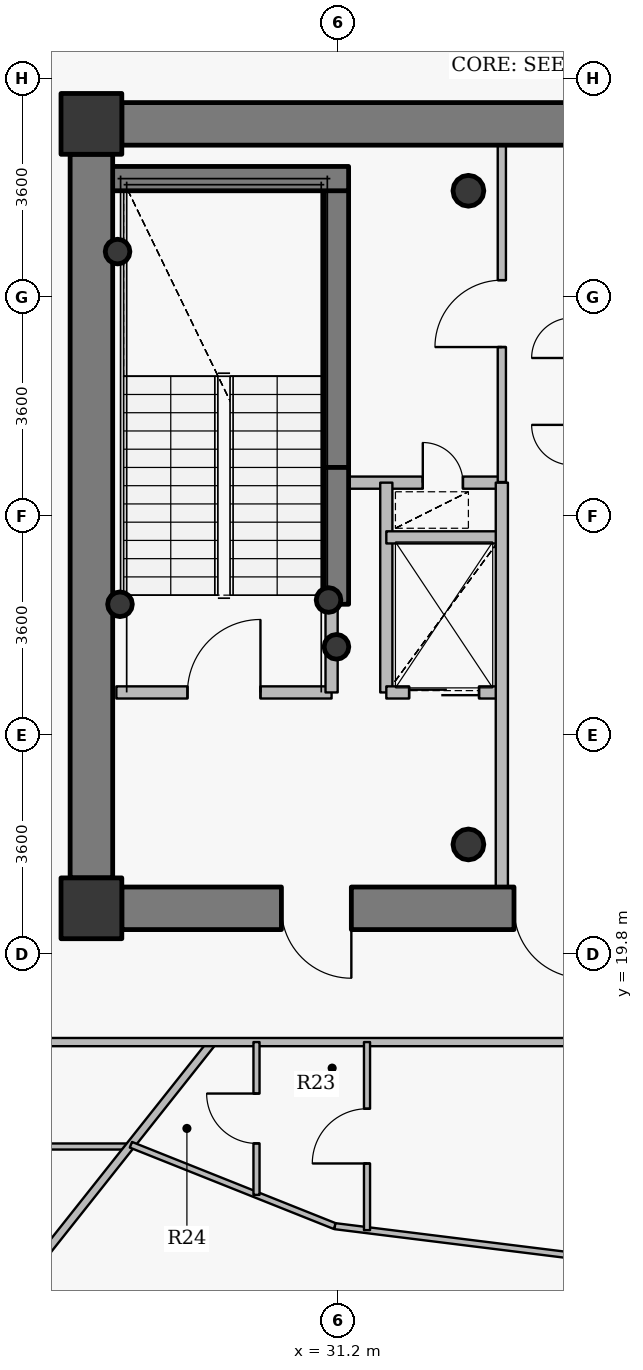
"""IFC4 building model, lengths in metres.
Left out: names, types, materials, properties, quantities, classifications, styles, units other than length and angle.
Written with IfcOpenShell. Run it as: python <this file> out.ifc"""

import sys

from ifc_helpers import new_model, si_unit, direction, frame, frame_2d, origin, origin_2d, place, context, subcontext, project, spatial, rectangle, hollow_circle, extrude, source, transform, mapped, element, fill, save


model = new_model("IFC4")
c1 = context("Model", 3, precision=1e-05, world=origin(), true_north=direction((0.0, 1.0)))
c2 = subcontext(c1, "Body", "Model", "MODEL_VIEW")
j1 = project(units=[si_unit("LENGTHUNIT", "METRE"), si_unit("PLANEANGLEUNIT", "RADIAN")], contexts=[c1])
p1 = place(None, origin())
s1 = spatial("IfcSite", under=j1, at=p1, CompositionType="ELEMENT")
p2 = place(p1, origin())
s2 = spatial("IfcBuilding", under=s1, at=p2, CompositionType="ELEMENT")
p3 = place(p2, frame((0.0, 0.0, 276.75)))
s3 = spatial("IfcBuildingStorey", under=s2, at=p3, CompositionType="ELEMENT", Elevation=276.75)
for number, where, z_axis, x_axis in (
    (1, (27.15, 20.55, 0.0), (0.0, 0.0, 1.0), (1.0, 0.0, 0.0)),
    (2, (27.15, 33.45, 0.0), (0.0, 0.0, 1.0), (1.0, 0.0, 0.0)),
):
    element("IfcColumn", number, at=place(p3, frame(where, z_axis=z_axis, x_axis=x_axis)), inside=s3, PredefinedType="COLUMN", context=c2, shape_type="SweptSolid", body=[
        extrude(rectangle(XDim=1.0, YDim=1.0, at=origin_2d()), origin(), (0.0, 0.0, 1.0), 3.75),
    ])
for number, where, z_axis, x_axis in (
    (3, (33.35, 21.6, 0.0), (0.0, 0.0, 1.0), (1.0, 0.0, 0.0)),
    (4, (33.35, 32.35, 0.0), (0.0, 0.0, 1.0), (1.0, 0.0, 0.0)),
):
    element("IfcColumn", number, at=place(p3, frame(where, z_axis=z_axis, x_axis=x_axis)), inside=s3, PredefinedType="COLUMN", context=c2, shape_type="SweptSolid", body=[
        extrude(hollow_circle(Radius=0.254, WallThickness=0.02, at=origin_2d()), origin(), (0.0, 0.0, 1.0), 3.75),
    ])
p4 = place(p3, frame((31.18, 27.8, 0.0), z_axis=(0.0, 0.0, 1.0), x_axis=(0.0, 1.0, 0.0)))
e5 = element("IfcWall", 5, at=p4, inside=s3, PredefinedType="SHEAR", context=c2, shape_type="SweptSolid", body=[
    extrude(rectangle(XDim=4.75, YDim=0.4, at=frame_2d((2.375, 0.0))), origin(), (0.0, 0.0, 1.0), 3.75),
])
p5 = place(p3, frame((27.25, 32.55, 0.0), z_axis=(0.0, 0.0, 1.0), x_axis=(1.0, 0.0, 0.0)))
e6 = element("IfcWall", 6, at=p5, inside=s3, PredefinedType="SHEAR", context=c2, shape_type="SweptSolid", body=[
    extrude(rectangle(XDim=4.13, YDim=0.4, at=frame_2d((2.065, 0.0))), origin(), (0.0, 0.0, 1.0), 3.75),
])
for number, where, z_axis, x_axis in (
    (7, (27.58, 31.35, 0.0), (0.0, 0.0, 1.0), (1.0, 0.0, 0.0)),
    (8, (31.05, 25.62, 0.0), (0.0, 0.0, 1.0), (1.0, 0.0, 0.0)),
    (9, (31.18, 24.85, 0.0), (0.0, 0.0, 1.0), (1.0, 0.0, 0.0)),
    (10, (27.62, 25.55, 0.0), (0.0, 0.0, 1.0), (1.0, 0.0, 0.0)),
):
    element("IfcColumn", number, at=place(p3, frame(where, z_axis=z_axis, x_axis=x_axis)), inside=s3, PredefinedType="COLUMN", context=c2, shape_type="SweptSolid", body=[
        extrude(hollow_circle(Radius=0.203, WallThickness=0.016, at=origin_2d()), origin(), (0.0, 0.0, 1.0), 3.75),
    ])
p6 = place(p3, frame((27.65, 33.45, 0.0), z_axis=(0.0, 0.0, 1.0), x_axis=(1.0, 0.0, 0.0)))
e11 = element("IfcWall", 11, at=p6, inside=s3, PredefinedType="SHEAR", context=c2, shape_type="SweptSolid", body=[
    extrude(rectangle(XDim=16.7, YDim=0.7, at=frame_2d((8.35, 0.0))), origin(), (0.0, 0.0, 1.0), 3.05),
])
p7 = place(p6, frame((12.775, 0.0, 0.0)))
e12 = element("IfcOpeningElement", 12, at=p7, cuts=e11, PredefinedType="OPENING", context=c2, shape_type="SweptSolid", body=[
    extrude(rectangle(XDim=1.15, YDim=2.15, at=origin_2d()), frame((0.575, 0.36, 1.075), z_axis=(0.0, -1.0, 0.0), x_axis=(1.0, 0.0, 0.0)), (0.0, 0.0, 1.0), 0.72),
])
p8 = place(p3, frame((44.35, 20.55, 0.0), z_axis=(0.0, 0.0, 1.0), x_axis=(-1.0, 0.0, 0.0)))
e13 = element("IfcWall", 13, at=p8, inside=s3, PredefinedType="SHEAR", context=c2, shape_type="SweptSolid", body=[
    extrude(rectangle(XDim=16.7, YDim=0.7, at=frame_2d((8.35, 0.0))), origin(), (0.0, 0.0, 1.0), 3.05),
])
p9 = place(p8, frame((12.925, 0.0, 0.0)))
e14 = element("IfcOpeningElement", 14, at=p9, cuts=e13, PredefinedType="OPENING", context=c2, shape_type="SweptSolid", body=[
    extrude(rectangle(XDim=1.15, YDim=2.15, at=origin_2d()), frame((0.575, 0.36, 1.075), z_axis=(0.0, -1.0, 0.0), x_axis=(1.0, 0.0, 0.0)), (0.0, 0.0, 1.0), 0.72),
])
p10 = place(p8, frame((9.1, 0.0, 0.0)))
e15 = element("IfcOpeningElement", 15, at=p10, cuts=e13, PredefinedType="OPENING", context=c2, shape_type="SweptSolid", body=[
    extrude(rectangle(XDim=1.15, YDim=2.15, at=origin_2d()), frame((0.575, 0.36, 1.075), z_axis=(0.0, -1.0, 0.0), x_axis=(1.0, 0.0, 0.0)), (0.0, 0.0, 1.0), 0.72),
])
p11 = place(p3, frame((27.15, 21.05, 0.0), z_axis=(0.0, 0.0, 1.0), x_axis=(0.0, 1.0, 0.0)))
e16 = element("IfcWall", 16, at=p11, inside=s3, PredefinedType="SHEAR", context=c2, shape_type="SweptSolid", body=[
    extrude(rectangle(XDim=11.9, YDim=0.7, at=frame_2d((5.95, 0.0))), origin(), (0.0, 0.0, 1.0), 3.05),
])
p12 = place(p3, frame((31.18, 25.55, 0.0), z_axis=(0.0, 0.0, 1.0), x_axis=(0.0, 1.0, 0.0)))
e17 = element("IfcWall", 17, at=p12, inside=s3, PredefinedType="SHEAR", context=c2, shape_type="SweptSolid", body=[
    extrude(rectangle(XDim=2.25, YDim=0.4, at=frame_2d((1.125, 0.0))), origin(), (0.0, 0.0, 1.0), 3.1),
])
p13 = place(p3, frame((18.118, 16.633, 0.0), z_axis=(0.0, 0.0, 1.0), x_axis=(1.0, 0.0, 0.0)))
e18 = element("IfcWall", 18, at=p13, inside=s3, PredefinedType="PARTITIONING", context=c2, shape_type="SweptSolid", body=[
    extrude(rectangle(XDim=9.659, YDim=0.1, at=frame_2d((4.83, 0.0))), origin(), (0.0, 0.0, 1.0), 2.985),
])
p14 = place(p13, frame((4.379, 0.0, 0.0)))
e19 = element("IfcOpeningElement", 19, at=p14, cuts=e18, PredefinedType="OPENING", context=c2, shape_type="SweptSolid", body=[
    extrude(rectangle(XDim=0.9, YDim=2.1, at=origin_2d()), frame((0.45, 0.06, 1.05), z_axis=(0.0, -1.0, 0.0), x_axis=(1.0, 0.0, 0.0)), (0.0, 0.0, 1.0), 0.12),
])
p15 = place(p3, frame((24.294, 12.242, 0.0), z_axis=(0.0, 0.0, 1.0), x_axis=(0.621439784824, 0.783461928774, 0.0)))
e20 = element("IfcWall", 20, at=p15, inside=s3, PredefinedType="PARTITIONING", context=c2, shape_type="SweptSolid", body=[
    extrude(rectangle(XDim=7.796, YDim=0.135, at=frame_2d((3.898, 0.0))), origin(), (0.0, 0.0, 1.0), 2.985),
])
p16 = place(p3, frame((24.95, 18.35, 0.0), z_axis=(0.0, 0.0, 1.0), x_axis=(1.0, 0.0, 0.0)))
e21 = element("IfcWall", 21, at=p16, inside=s3, PredefinedType="PARTITIONING", context=c2, shape_type="SweptSolid", body=[
    extrude(rectangle(XDim=10.1, YDim=0.135, at=frame_2d((5.05, 0.0))), origin(), (0.0, 0.0, 1.0), 3.035),
])
p17 = place(p3, frame((27.56, 24.1, 0.0), z_axis=(0.0, 0.0, 1.0), x_axis=(1.0, 0.0, 0.0)))
e22 = element("IfcWall", 22, at=p17, inside=s3, PredefinedType="PARTITIONING", context=c2, shape_type="SweptSolid", body=[
    extrude(rectangle(XDim=3.54, YDim=0.2, at=frame_2d((1.77, 0.0))), origin(), (0.0, 0.0, 1.0), 3.5),
])
p18 = place(p17, frame((1.17, 0.0, 0.0)))
e23 = element("IfcOpeningElement", 23, at=p18, cuts=e22, PredefinedType="OPENING", context=c2, shape_type="SweptSolid", body=[
    extrude(rectangle(XDim=1.2, YDim=2.15, at=origin_2d()), frame((0.6, 0.11, 1.075), z_axis=(0.0, -1.0, 0.0), x_axis=(1.0, 0.0, 0.0)), (0.0, 0.0, 1.0), 0.22),
])
p19 = place(p3, frame((27.8, 16.662, 0.0), z_axis=(0.0, 0.0, 1.0), x_axis=(0.928783988526, -0.370621508628, 0.0)))
e24 = element("IfcWall", 24, at=p19, inside=s3, PredefinedType="PARTITIONING", context=c2, shape_type="SweptSolid", body=[
    extrude(rectangle(XDim=3.613, YDim=0.1, at=frame_2d((1.806, 0.0))), origin(), (0.0, 0.0, 1.0), 3.035),
])
p20 = place(p3, frame((29.865, 15.837, 0.0), z_axis=(0.0, 0.0, 1.0), x_axis=(0.0, 1.0, 0.0)))
e25 = element("IfcWall", 25, at=p20, inside=s3, PredefinedType="PARTITIONING", context=c2, shape_type="SweptSolid", body=[
    extrude(rectangle(XDim=2.513, YDim=0.1, at=frame_2d((1.256, 0.0))), origin(), (0.0, 0.0, 1.0), 3.035),
])
p21 = place(p20, frame((0.846, 0.0, 0.0)))
e26 = element("IfcOpeningElement", 26, at=p21, cuts=e25, PredefinedType="OPENING", context=c2, shape_type="SweptSolid", body=[
    extrude(rectangle(XDim=0.82, YDim=2.1, at=origin_2d()), frame((0.41, 0.06, 1.05), z_axis=(0.0, -1.0, 0.0), x_axis=(1.0, 0.0, 0.0)), (0.0, 0.0, 1.0), 0.12),
])
p22 = place(p3, frame((31.1, 24.1, 0.0), z_axis=(0.0, 0.0, 1.0), x_axis=(0.0, 1.0, 0.0)))
e27 = element("IfcWall", 27, at=p22, inside=s3, PredefinedType="PARTITIONING", context=c2, shape_type="SweptSolid", body=[
    extrude(rectangle(XDim=1.44, YDim=0.2, at=frame_2d((0.72, 0.0))), origin(), (0.0, 0.0, 1.0), 3.5),
])
p23 = place(p3, frame((31.1, 27.55, 0.0), z_axis=(0.0, 0.0, 1.0), x_axis=(1.0, 0.0, 0.0)))
e28 = element("IfcWall", 28, at=p23, inside=s3, PredefinedType="PARTITIONING", context=c2, shape_type="SweptSolid", body=[
    extrude(rectangle(XDim=2.8, YDim=0.2, at=frame_2d((1.4, 0.0))), origin(), (0.0, 0.0, 1.0), 3.085),
])
p24 = place(p23, frame((1.5, 0.0, 0.0)))
e29 = element("IfcOpeningElement", 29, at=p24, cuts=e28, PredefinedType="OPENING", context=c2, shape_type="SweptSolid", body=[
    extrude(rectangle(XDim=0.66, YDim=2.05, at=origin_2d()), frame((0.33, 0.11, 1.025), z_axis=(0.0, -1.0, 0.0), x_axis=(1.0, 0.0, 0.0)), (0.0, 0.0, 1.0), 0.22),
])
p25 = place(p3, frame((31.155, 15.323, 0.0), z_axis=(0.0, 0.0, 1.0), x_axis=(0.992397939869, -0.123070422704, 0.0)))
e30 = element("IfcWall", 30, at=p25, inside=s3, PredefinedType="PARTITIONING", context=c2, shape_type="SweptSolid", body=[
    extrude(rectangle(XDim=3.958, YDim=0.1, at=frame_2d((1.979, 0.0))), origin(), (0.0, 0.0, 1.0), 3.5),
])
p26 = place(p3, frame((31.683, 15.258, 0.0), z_axis=(0.0, 0.0, 1.0), x_axis=(0.0, 1.0, 0.0)))
e31 = element("IfcWall", 31, at=p26, inside=s3, PredefinedType="PARTITIONING", context=c2, shape_type="SweptSolid", body=[
    extrude(rectangle(XDim=3.093, YDim=0.1, at=frame_2d((1.546, 0.0))), origin(), (0.0, 0.0, 1.0), 3.5),
])
p27 = place(p26, frame((1.096, 0.0, 0.0)))
e32 = element("IfcOpeningElement", 32, at=p27, cuts=e31, PredefinedType="OPENING", context=c2, shape_type="SweptSolid", body=[
    extrude(rectangle(XDim=0.9, YDim=2.1, at=origin_2d()), frame((0.45, 0.06, 1.05), z_axis=(0.0, -1.0, 0.0), x_axis=(1.0, 0.0, 0.0)), (0.0, 0.0, 1.0), 0.12),
])
p28 = place(p3, frame((32.0, 24.1, 0.0), z_axis=(0.0, 0.0, 1.0), x_axis=(0.0, 1.0, 0.0)))
e33 = element("IfcWall", 33, at=p28, inside=s3, PredefinedType="PARTITIONING", context=c2, shape_type="SweptSolid", body=[
    extrude(rectangle(XDim=3.45, YDim=0.2, at=frame_2d((1.725, 0.0))), origin(), (0.0, 0.0, 1.0), 3.5),
])
p29 = place(p3, frame((32.0, 24.1, 0.0), z_axis=(0.0, 0.0, 1.0), x_axis=(1.0, 0.0, 0.0)))
e34 = element("IfcWall", 34, at=p29, inside=s3, PredefinedType="PARTITIONING", context=c2, shape_type="SweptSolid", body=[
    extrude(rectangle(XDim=1.9, YDim=0.2, at=frame_2d((0.95, 0.0))), origin(), (0.0, 0.0, 1.0), 3.085),
])
p30 = place(p29, frame((0.375, 0.0, 0.0)))
e35 = element("IfcOpeningElement", 35, at=p30, cuts=e34, PredefinedType="OPENING", context=c2, shape_type="SweptSolid", body=[
    extrude(rectangle(XDim=1.15, YDim=2.15, at=origin_2d()), frame((0.575, 0.11, 1.075), z_axis=(0.0, -1.0, 0.0), x_axis=(1.0, 0.0, 0.0)), (0.0, 0.0, 1.0), 0.22),
])
p31 = place(p3, frame((32.0, 26.65, 0.0), z_axis=(0.0, 0.0, 1.0), x_axis=(1.0, 0.0, 0.0)))
e36 = element("IfcWall", 36, at=p31, inside=s3, PredefinedType="PARTITIONING", context=c2, shape_type="SweptSolid", body=[
    extrude(rectangle(XDim=1.9, YDim=0.2, at=frame_2d((0.95, 0.0))), origin(), (0.0, 0.0, 1.0), 3.085),
])
p32 = place(p3, frame((33.9, 20.9, 0.0), z_axis=(0.0, 0.0, 1.0), x_axis=(0.0, 1.0, 0.0)))
e37 = element("IfcWall", 37, at=p32, inside=s3, PredefinedType="PARTITIONING", context=c2, shape_type="SweptSolid", body=[
    extrude(rectangle(XDim=6.65, YDim=0.2, at=frame_2d((3.325, 0.0))), origin(), (0.0, 0.0, 1.0), 3.085),
])
p33 = place(p3, frame((33.9, 27.56, 0.0), z_axis=(0.0, 0.0, 1.0), x_axis=(0.0, 1.0, 0.0)))
e38 = element("IfcWall", 38, at=p33, inside=s3, PredefinedType="PARTITIONING", context=c2, shape_type="SweptSolid", body=[
    extrude(rectangle(XDim=5.54, YDim=0.135, at=frame_2d((2.77, 0.0))), origin(), (0.0, 0.0, 1.0), 3.085),
])
p34 = place(p33, frame((2.22, 0.0, 0.0)))
e39 = element("IfcOpeningElement", 39, at=p34, cuts=e38, PredefinedType="OPENING", context=c2, shape_type="SweptSolid", body=[
    extrude(rectangle(XDim=1.1, YDim=2.15, at=origin_2d()), frame((0.55, 0.078, 1.075), z_axis=(0.0, -1.0, 0.0), x_axis=(1.0, 0.0, 0.0)), (0.0, 0.0, 1.0), 0.155),
])
p35 = place(p3, frame((34.691, 9.661, 0.0), z_axis=(0.0, 0.0, 1.0), x_axis=(0.0752647297, 0.997163587614, 0.0)))
e40 = element("IfcWall", 40, at=p35, inside=s3, PredefinedType="PARTITIONING", context=c2, shape_type="SweptSolid", body=[
    extrude(rectangle(XDim=5.19, YDim=0.1, at=frame_2d((2.595, 0.0))), origin(), (0.0, 0.0, 1.0), 2.985),
])
p36 = place(p35, frame((2.145, 0.0, 0.0)))
e41 = element("IfcOpeningElement", 41, at=p36, cuts=e40, PredefinedType="OPENING", context=c2, shape_type="SweptSolid", body=[
    extrude(rectangle(XDim=0.9, YDim=2.1, at=origin_2d()), frame((0.45, 0.06, 1.05), z_axis=(0.0, -1.0, 0.0), x_axis=(1.0, 0.0, 0.0)), (0.0, 0.0, 1.0), 0.12),
])
p37 = place(p3, frame((27.64, 33.8, 0.0), z_axis=(0.0, 0.0, 1.0), x_axis=(-1.0, 0.0, 0.0)))
e42 = element("IfcWall", 42, at=p37, inside=s3, PredefinedType="PARTITIONING", context=c2, shape_type="SweptSolid", body=[
    extrude(rectangle(XDim=0.84, YDim=0.135, at=frame_2d((0.42, 0.0))), origin(), (0.0, 0.0, 1.0), 3.035),
])
p38 = place(p3, frame((26.8, 33.492, 0.0), z_axis=(0.0, 0.0, 1.0), x_axis=(0.0, -1.0, 0.0)))
e43 = element("IfcWall", 43, at=p38, inside=s3, PredefinedType="PARTITIONING", context=c2, shape_type="SweptSolid", body=[
    extrude(rectangle(XDim=0.532, YDim=0.135, at=frame_2d((0.266, 0.0))), origin(), (0.0, 0.0, 1.0), 3.5),
])
p39 = place(p3, frame((26.8, 21.04, 0.0), z_axis=(0.0, 0.0, 1.0), x_axis=(0.0, -1.0, 0.0)))
e44 = element("IfcWall", 44, at=p39, inside=s3, PredefinedType="PARTITIONING", context=c2, shape_type="SweptSolid", body=[
    extrude(rectangle(XDim=0.84, YDim=0.135, at=frame_2d((0.42, 0.0))), origin(), (0.0, 0.0, 1.0), 3.035),
])
p40 = place(p3, frame((27.107, 20.2, 0.0), z_axis=(0.0, 0.0, 1.0), x_axis=(1.0, 0.0, 0.0)))
e45 = element("IfcWall", 45, at=p40, inside=s3, PredefinedType="PARTITIONING", context=c2, shape_type="SweptSolid", body=[
    extrude(rectangle(XDim=0.532, YDim=0.135, at=frame_2d((0.266, 0.0))), origin(), (0.0, 0.0, 1.0), 3.035),
])
m1 = source(origin(), c2, "Body", "SweptSolid", [
    extrude(rectangle(XDim=1.15, YDim=2.15, at=origin_2d()), frame((0.575, 0.025, 1.075), z_axis=(0.0, -1.0, 0.0), x_axis=(1.0, 0.0, 0.0)), (0.0, 0.0, 1.0), 0.05),
])
p41 = place(p9, origin())
e46 = element("IfcDoor", 46, at=p41, inside=s3, OperationType="SINGLE_SWING_LEFT", PredefinedType="DOOR", context=c2, shape_type="MappedRepresentation", body=[
    mapped(m1, transform((0.0, 0.0, 0.0), x_axis=(1.0, 0.0, 0.0), y_axis=(0.0, 1.0, 0.0), z_axis=(0.0, 0.0, 1.0), scale=1.0)),
])
fill(e14, e46)
p42 = place(p10, origin())
e47 = element("IfcDoor", 47, at=p42, inside=s3, OperationType="SINGLE_SWING_LEFT", PredefinedType="DOOR", context=c2, shape_type="MappedRepresentation", body=[
    mapped(m1, transform((0.0, 0.0, 0.0), x_axis=(1.0, 0.0, 0.0), y_axis=(0.0, 1.0, 0.0), z_axis=(0.0, 0.0, 1.0), scale=1.0)),
])
fill(e15, e47)
m2 = source(origin(), c2, "Body", "SweptSolid", [
    extrude(rectangle(XDim=1.2, YDim=2.15, at=origin_2d()), frame((0.6, 0.025, 1.075), z_axis=(0.0, -1.0, 0.0), x_axis=(1.0, 0.0, 0.0)), (0.0, 0.0, 1.0), 0.05),
])
p43 = place(p18, origin())
e48 = element("IfcDoor", 48, at=p43, inside=s3, OperationType="SINGLE_SWING_RIGHT", PredefinedType="DOOR", context=c2, shape_type="MappedRepresentation", body=[
    mapped(m2, transform((0.0, 0.0, 0.0), x_axis=(1.0, 0.0, 0.0), y_axis=(0.0, 1.0, 0.0), z_axis=(0.0, 0.0, 1.0), scale=1.0)),
])
fill(e23, e48)
m3 = source(origin(), c2, "Body", "SweptSolid", [
    extrude(rectangle(XDim=1.15, YDim=2.15, at=origin_2d()), frame((0.575, 0.025, 1.075), z_axis=(0.0, -1.0, 0.0), x_axis=(1.0, 0.0, 0.0)), (0.0, 0.0, 1.0), 0.05),
])
p44 = place(p30, origin())
e49 = element("IfcDoor", 49, at=p44, inside=s3, OperationType="DOUBLE_DOOR_SLIDING", PredefinedType="USERDEFINED", context=c2, shape_type="MappedRepresentation", body=[
    mapped(m3, transform((0.0, 0.0, 0.0), x_axis=(1.0, 0.0, 0.0), y_axis=(0.0, 1.0, 0.0), z_axis=(0.0, 0.0, 1.0), scale=1.0)),
])
fill(e35, e49)
m4 = source(origin(), c2, "Body", "SweptSolid", [
    extrude(rectangle(XDim=0.9, YDim=2.1, at=origin_2d()), frame((0.45, 0.025, 1.05), z_axis=(0.0, -1.0, 0.0), x_axis=(1.0, 0.0, 0.0)), (0.0, 0.0, 1.0), 0.05),
])
p45 = place(p27, origin())
e50 = element("IfcDoor", 50, at=p45, inside=s3, OperationType="SINGLE_SWING_LEFT", PredefinedType="DOOR", context=c2, shape_type="MappedRepresentation", body=[
    mapped(m4, transform((0.0, 0.0, 0.0), x_axis=(1.0, 0.0, 0.0), y_axis=(0.0, 1.0, 0.0), z_axis=(0.0, 0.0, 1.0), scale=1.0)),
])
fill(e32, e50)
m5 = source(origin(), c2, "Body", "SweptSolid", [
    extrude(rectangle(XDim=0.82, YDim=2.1, at=origin_2d()), frame((0.41, 0.025, 1.05), z_axis=(0.0, -1.0, 0.0), x_axis=(1.0, 0.0, 0.0)), (0.0, 0.0, 1.0), 0.05),
])
p46 = place(p21, origin())
e51 = element("IfcDoor", 51, at=p46, inside=s3, OperationType="SINGLE_SWING_RIGHT", PredefinedType="DOOR", context=c2, shape_type="MappedRepresentation", body=[
    mapped(m5, transform((0.0, 0.0, 0.0), x_axis=(1.0, 0.0, 0.0), y_axis=(0.0, 1.0, 0.0), z_axis=(0.0, 0.0, 1.0), scale=1.0)),
])
fill(e26, e51)
m6 = source(origin(), c2, "Body", "SweptSolid", [
    extrude(rectangle(XDim=1.1, YDim=2.15, at=origin_2d()), frame((0.55, 0.025, 1.075), z_axis=(0.0, -1.0, 0.0), x_axis=(1.0, 0.0, 0.0)), (0.0, 0.0, 1.0), 0.05),
])
p47 = place(p34, origin())
e52 = element("IfcDoor", 52, at=p47, inside=s3, OperationType="SINGLE_SWING_LEFT", PredefinedType="DOOR", context=c2, shape_type="MappedRepresentation", body=[
    mapped(m6, transform((0.0, 0.0, 0.0), x_axis=(1.0, 0.0, 0.0), y_axis=(0.0, 1.0, 0.0), z_axis=(0.0, 0.0, 1.0), scale=1.0)),
])
fill(e39, e52)
m7 = source(origin(), c2, "Body", "SweptSolid", [
    extrude(rectangle(XDim=0.66, YDim=2.05, at=origin_2d()), frame((0.33, 0.025, 1.025), z_axis=(0.0, -1.0, 0.0), x_axis=(1.0, 0.0, 0.0)), (0.0, 0.0, 1.0), 0.05),
])
p48 = place(p24, origin())
e53 = element("IfcDoor", 53, at=p48, inside=s3, OperationType="SINGLE_SWING_LEFT", PredefinedType="USERDEFINED", context=c2, shape_type="MappedRepresentation", body=[
    mapped(m7, transform((0.0, 0.0, 0.0), x_axis=(1.0, 0.0, 0.0), y_axis=(0.0, 1.0, 0.0), z_axis=(0.0, 0.0, 1.0), scale=1.0)),
])
fill(e29, e53)
save(model, sys.argv[1])
